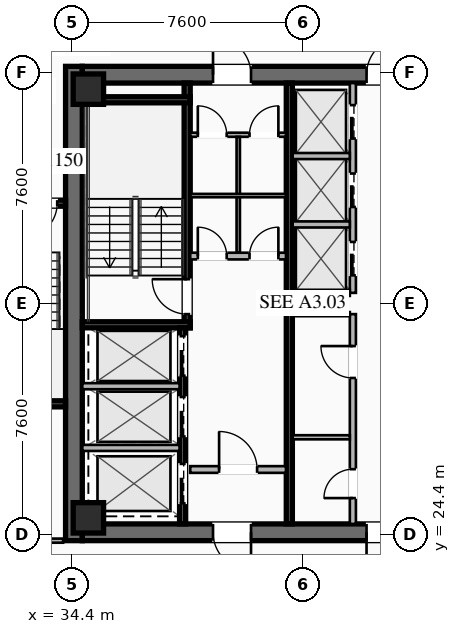
"""IFC4 building model, lengths in metres.
Left out: names, types, materials, properties, quantities, classifications, styles, units other than length and angle.
Written with IfcOpenShell. Run it as: python <this file> out.ifc"""

import sys

from ifc_helpers import new_model, si_unit, direction, frame, frame_2d, origin, origin_2d, place, context, subcontext, project, spatial, rectangle, hollow_rectangle, extrude, element, fill, save


model = new_model("IFC4")
c1 = context("Model", 3, precision=1e-05, world=origin(), true_north=direction((0.0, 1.0)))
c2 = subcontext(c1, "Body", "Model", "MODEL_VIEW")
j1 = project(units=[si_unit("LENGTHUNIT", "METRE"), si_unit("PLANEANGLEUNIT", "RADIAN")], contexts=[c1])
p1 = place(None, origin())
s1 = spatial("IfcSite", under=j1, at=p1, CompositionType="ELEMENT")
p2 = place(p1, origin())
s2 = spatial("IfcBuilding", under=s1, at=p2, CompositionType="ELEMENT")
p3 = place(p2, frame((0.0, 0.0, 117.95)))
s3 = spatial("IfcBuildingStorey", under=s2, at=p3, CompositionType="ELEMENT", Elevation=117.95)
p4 = place(p3, frame((34.475, 24.2, 0.0), z_axis=(0.0, 0.0, 1.0), x_axis=(0.0, 1.0, 0.0)))
e1 = element("IfcWall", 1, at=p4, inside=s3, PredefinedType="SHEAR", context=c2, shape_type="SweptSolid", body=[
    extrude(rectangle(XDim=15.6, YDim=0.55, at=frame_2d((7.8, 0.0))), origin(), (0.0, 0.0, 1.0), 3.55),
])
p5 = place(p3, frame((49.25, 24.475, 0.0), z_axis=(0.0, 0.0, 1.0), x_axis=(-1.0, 0.0, 0.0)))
e2 = element("IfcWall", 2, at=p5, inside=s3, PredefinedType="SHEAR", context=c2, shape_type="SweptSolid", body=[
    extrude(rectangle(XDim=14.5, YDim=0.55, at=frame_2d((7.25, 0.0))), origin(), (0.0, 0.0, 1.0), 3.55),
])
p6 = place(p5, frame((8.95, 0.0, 0.0)))
e3 = element("IfcOpeningElement", 3, at=p6, cuts=e2, PredefinedType="OPENING", context=c2, shape_type="SweptSolid", body=[
    extrude(rectangle(XDim=1.25, YDim=2.25, at=frame_2d((0.625, 1.125))), frame((0.0, 0.285, 0.0), z_axis=(0.0, -1.0, 0.0), x_axis=(1.0, 0.0, 0.0)), (0.0, 0.0, 1.0), 0.57),
])
p7 = place(p5, frame((3.9, 0.0, 0.0)))
e4 = element("IfcOpeningElement", 4, at=p7, cuts=e2, PredefinedType="OPENING", context=c2, shape_type="SweptSolid", body=[
    extrude(rectangle(XDim=1.25, YDim=2.25, at=frame_2d((0.625, 1.125))), frame((0.0, 0.285, 0.0), z_axis=(0.0, -1.0, 0.0), x_axis=(1.0, 0.0, 0.0)), (0.0, 0.0, 1.0), 0.57),
])
p8 = place(p3, frame((34.75, 39.525, 0.0), z_axis=(0.0, 0.0, 1.0), x_axis=(1.0, 0.0, 0.0)))
e5 = element("IfcWall", 5, at=p8, inside=s3, PredefinedType="SHEAR", context=c2, shape_type="SweptSolid", body=[
    extrude(rectangle(XDim=14.5, YDim=0.55, at=frame_2d((7.25, 0.0))), origin(), (0.0, 0.0, 1.0), 3.55),
])
p9 = place(p8, frame((4.3, 0.0, 0.0)))
e6 = element("IfcOpeningElement", 6, at=p9, cuts=e5, PredefinedType="OPENING", context=c2, shape_type="SweptSolid", body=[
    extrude(rectangle(XDim=1.25, YDim=2.25, at=frame_2d((0.625, 1.125))), frame((0.0, 0.285, 0.0), z_axis=(0.0, -1.0, 0.0), x_axis=(1.0, 0.0, 0.0)), (0.0, 0.0, 1.0), 0.57),
])
p10 = place(p8, frame((9.35, 0.0, 0.0)))
e7 = element("IfcOpeningElement", 7, at=p10, cuts=e5, PredefinedType="OPENING", context=c2, shape_type="SweptSolid", body=[
    extrude(rectangle(XDim=1.25, YDim=2.25, at=frame_2d((0.625, 1.125))), frame((0.0, 0.285, 0.0), z_axis=(0.0, -1.0, 0.0), x_axis=(1.0, 0.0, 0.0)), (0.0, 0.0, 1.0), 0.57),
])
for number, where, z_axis, x_axis in (
    (8, (34.95, 24.95, 0.0), (0.0, 0.0, 1.0), (1.0, 0.0, 0.0)),
    (9, (34.95, 39.05, 0.0), (0.0, 0.0, 1.0), (1.0, 0.0, 0.0)),
):
    element("IfcColumn", number, at=place(p3, frame(where, z_axis=z_axis, x_axis=x_axis)), inside=s3, PredefinedType="COLUMN", context=c2, shape_type="SweptSolid", body=[
        extrude(hollow_rectangle(XDim=1.0, YDim=1.0, WallThickness=0.04, at=origin_2d()), origin(), (0.0, 0.0, 1.0), 3.37),
    ])
p11 = place(p3, frame((38.2, 31.2, 0.0), z_axis=(0.0, 0.0, 1.0), x_axis=(0.0, 1.0, 0.0)))
e10 = element("IfcWall", 10, at=p11, inside=s3, PredefinedType="SHEAR", context=c2, shape_type="SweptSolid", body=[
    extrude(rectangle(XDim=8.05, YDim=0.2, at=frame_2d((4.025, 0.0))), origin(), (0.0, 0.0, 1.0), 3.37),
])
p12 = place(p11, frame((0.45, 0.0, 0.0)))
e11 = element("IfcOpeningElement", 11, at=p12, cuts=e10, PredefinedType="OPENING", context=c2, shape_type="SweptSolid", body=[
    extrude(rectangle(XDim=1.15, YDim=2.2, at=frame_2d((0.575, 1.1))), frame((0.0, 0.11, 0.0), z_axis=(0.0, -1.0, 0.0), x_axis=(1.0, 0.0, 0.0)), (0.0, 0.0, 1.0), 0.22),
])
for number, where, z_axis, x_axis in (
    (12, (34.75, 31.3, 0.0), (0.0, 0.0, 1.0), (1.0, 0.0, 0.0)),
    (13, (34.75, 38.7, 0.0), (0.0, 0.0, 1.0), (1.0, 0.0, 0.0)),
):
    element("IfcWall", number, at=place(p3, frame(where, z_axis=z_axis, x_axis=x_axis)), inside=s3, PredefinedType="SHEAR", context=c2, shape_type="SweptSolid", body=[
        extrude(rectangle(XDim=3.55, YDim=0.2, at=frame_2d((1.775, 0.0))), origin(), (0.0, 0.0, 1.0), 3.37),
    ])
p13 = place(p3, frame((41.56, 24.75, 0.0), z_axis=(0.0, 0.0, 1.0), x_axis=(0.0, 1.0, 0.0)))
e14 = element("IfcWall", 14, at=p13, inside=s3, PredefinedType="SHEAR", context=c2, shape_type="SweptSolid", body=[
    extrude(rectangle(XDim=14.5, YDim=0.2, at=frame_2d((7.25, 0.0))), origin(), (0.0, 0.0, 1.0), 3.37),
])
p14 = place(p3, frame((38.3, 33.56, 0.0), z_axis=(0.0, 0.0, 1.0), x_axis=(1.0, 0.0, 0.0)))
e15 = element("IfcWall", 15, at=p14, inside=s3, PredefinedType="SOLIDWALL", context=c2, shape_type="SweptSolid", body=[
    extrude(rectangle(XDim=3.15, YDim=0.22, at=frame_2d((1.575, 0.0))), origin(), (0.0, 0.0, 1.0), 2.723),
])
p15 = place(p14, frame((0.25, 0.0, 0.0)))
e16 = element("IfcOpeningElement", 16, at=p15, cuts=e15, PredefinedType="OPENING", context=c2, shape_type="SweptSolid", body=[
    extrude(rectangle(XDim=0.95, YDim=2.05, at=frame_2d((0.475, 1.025))), frame((0.0, 0.12, 0.0), z_axis=(0.0, -1.0, 0.0), x_axis=(1.0, 0.0, 0.0)), (0.0, 0.0, 1.0), 0.24),
])
p16 = place(p14, frame((1.95, 0.0, 0.0)))
e17 = element("IfcOpeningElement", 17, at=p16, cuts=e15, PredefinedType="OPENING", context=c2, shape_type="SweptSolid", body=[
    extrude(rectangle(XDim=0.95, YDim=2.05, at=frame_2d((0.475, 1.025))), frame((0.0, 0.12, 0.0), z_axis=(0.0, -1.0, 0.0), x_axis=(1.0, 0.0, 0.0)), (0.0, 0.0, 1.0), 0.24),
])
p17 = place(p3, frame((38.3, 26.54, 0.0), z_axis=(0.0, 0.0, 1.0), x_axis=(1.0, 0.0, 0.0)))
e18 = element("IfcWall", 18, at=p17, inside=s3, PredefinedType="SOLIDWALL", context=c2, shape_type="SweptSolid", body=[
    extrude(rectangle(XDim=3.15, YDim=0.22, at=frame_2d((1.575, 0.0))), origin(), (0.0, 0.0, 1.0), 2.723),
])
p18 = place(p17, frame((0.95, 0.0, 0.0)))
e19 = element("IfcOpeningElement", 19, at=p18, cuts=e18, PredefinedType="OPENING", context=c2, shape_type="SweptSolid", body=[
    extrude(rectangle(XDim=1.25, YDim=2.25, at=frame_2d((0.625, 1.125))), frame((0.0, 0.12, 0.0), z_axis=(0.0, -1.0, 0.0), x_axis=(1.0, 0.0, 0.0)), (0.0, 0.0, 1.0), 0.24),
])
p19 = place(p3, frame((38.05, 24.75, 0.0), z_axis=(0.0, 0.0, 1.0), x_axis=(0.0, 1.0, 0.0)))
e20 = element("IfcWall", 20, at=p19, inside=s3, PredefinedType="SHEAR", context=c2, shape_type="SweptSolid", body=[
    extrude(rectangle(XDim=6.45, YDim=0.2, at=frame_2d((3.225, 0.0))), origin(), (0.0, 0.0, 1.0), 3.37),
])
p20 = place(p19, frame((4.875, 0.0, 0.0)))
e21 = element("IfcOpeningElement", 21, at=p20, cuts=e20, PredefinedType="OPENING", context=c2, shape_type="SweptSolid", body=[
    extrude(rectangle(XDim=1.3, YDim=2.25, at=frame_2d((0.65, 1.125))), frame((0.0, 0.11, 0.0), z_axis=(0.0, -1.0, 0.0), x_axis=(1.0, 0.0, 0.0)), (0.0, 0.0, 1.0), 0.22),
])
p21 = place(p19, frame((2.875, 0.0, 0.0)))
e22 = element("IfcOpeningElement", 22, at=p21, cuts=e20, PredefinedType="OPENING", context=c2, shape_type="SweptSolid", body=[
    extrude(rectangle(XDim=1.3, YDim=2.25, at=frame_2d((0.65, 1.125))), frame((0.0, 0.11, 0.0), z_axis=(0.0, -1.0, 0.0), x_axis=(1.0, 0.0, 0.0)), (0.0, 0.0, 1.0), 0.22),
])
p22 = place(p19, frame((0.675, 0.0, 0.0)))
e23 = element("IfcOpeningElement", 23, at=p22, cuts=e20, PredefinedType="OPENING", context=c2, shape_type="SweptSolid", body=[
    extrude(rectangle(XDim=1.3, YDim=2.25, at=frame_2d((0.65, 1.125))), frame((0.0, 0.11, 0.0), z_axis=(0.0, -1.0, 0.0), x_axis=(1.0, 0.0, 0.0)), (0.0, 0.0, 1.0), 0.22),
])
for number, where, z_axis, x_axis in (
    (24, (34.75, 27.25, 0.0), (0.0, 0.0, 1.0), (1.0, 0.0, 0.0)),
    (25, (34.75, 29.28, 0.0), (0.0, 0.0, 1.0), (1.0, 0.0, 0.0)),
):
    element("IfcWall", number, at=place(p3, frame(where, z_axis=z_axis, x_axis=x_axis)), inside=s3, PredefinedType="SOLIDWALL", context=c2, shape_type="SweptSolid", body=[
        extrude(rectangle(XDim=3.2, YDim=0.2, at=frame_2d((1.6, 0.0))), origin(), (0.0, 0.0, 1.0), 3.37),
    ])
p23 = place(p3, frame((38.3, 37.55, 0.0), z_axis=(0.0, 0.0, 1.0), x_axis=(1.0, 0.0, 0.0)))
e26 = element("IfcWall", 26, at=p23, inside=s3, PredefinedType="PARTITIONING", context=c2, shape_type="SweptSolid", body=[
    extrude(rectangle(XDim=3.15, YDim=0.135, at=frame_2d((1.575, 0.0))), origin(), (0.0, 0.0, 1.0), 2.723),
])
p24 = place(p23, frame((0.25, 0.0, 0.0)))
e27 = element("IfcOpeningElement", 27, at=p24, cuts=e26, PredefinedType="OPENING", context=c2, shape_type="SweptSolid", body=[
    extrude(rectangle(XDim=0.95, YDim=2.05, at=frame_2d((0.475, 1.025))), frame((0.0, 0.077, 0.0), z_axis=(0.0, -1.0, 0.0), x_axis=(1.0, 0.0, 0.0)), (0.0, 0.0, 1.0), 0.155),
])
p25 = place(p23, frame((1.95, 0.0, 0.0)))
e28 = element("IfcOpeningElement", 28, at=p25, cuts=e26, PredefinedType="OPENING", context=c2, shape_type="SweptSolid", body=[
    extrude(rectangle(XDim=0.95, YDim=2.05, at=frame_2d((0.475, 1.025))), frame((0.0, 0.077, 0.0), z_axis=(0.0, -1.0, 0.0), x_axis=(1.0, 0.0, 0.0)), (0.0, 0.0, 1.0), 0.155),
])
p26 = place(p3, frame((39.88, 33.68, 0.0), z_axis=(0.0, 0.0, 1.0), x_axis=(0.0, 1.0, 0.0)))
e29 = element("IfcWall", 29, at=p26, inside=s3, PredefinedType="PARTITIONING", context=c2, shape_type="SweptSolid", body=[
    extrude(rectangle(XDim=3.8, YDim=0.11, at=frame_2d((1.9, 0.0))), origin(), (0.0, 0.0, 1.0), 2.723),
])
p27 = place(p3, frame((38.3, 35.55, 0.0), z_axis=(0.0, 0.0, 1.0), x_axis=(1.0, 0.0, 0.0)))
e30 = element("IfcWall", 30, at=p27, inside=s3, PredefinedType="PARTITIONING", context=c2, shape_type="SweptSolid", body=[
    extrude(rectangle(XDim=3.15, YDim=0.11, at=frame_2d((1.575, 0.0))), origin(), (0.0, 0.0, 1.0), 2.723),
])
p28 = place(p3, frame((43.65, 24.75, 0.0), z_axis=(0.0, 0.0, 1.0), x_axis=(0.0, 1.0, 0.0)))
e31 = element("IfcWall", 31, at=p28, inside=s3, PredefinedType="SOLIDWALL", context=c2, shape_type="SweptSolid", body=[
    extrude(rectangle(XDim=6.9, YDim=0.2, at=frame_2d((3.45, 0.0))), origin(), (0.0, 0.0, 1.0), 2.723),
])
p29 = place(p28, frame((0.85, 0.0, 0.0)))
e32 = element("IfcOpeningElement", 32, at=p29, cuts=e31, PredefinedType="OPENING", context=c2, shape_type="SweptSolid", body=[
    extrude(rectangle(XDim=0.95, YDim=2.05, at=frame_2d((0.475, 1.025))), frame((0.0, 0.11, 0.0), z_axis=(0.0, -1.0, 0.0), x_axis=(1.0, 0.0, 0.0)), (0.0, 0.0, 1.0), 0.22),
])
p30 = place(p28, frame((4.8, 0.0, 0.0)))
e33 = element("IfcOpeningElement", 33, at=p30, cuts=e31, PredefinedType="OPENING", context=c2, shape_type="SweptSolid", body=[
    extrude(rectangle(XDim=1.05, YDim=2.2, at=frame_2d((0.525, 1.1))), frame((0.0, 0.11, 0.0), z_axis=(0.0, -1.0, 0.0), x_axis=(1.0, 0.0, 0.0)), (0.0, 0.0, 1.0), 0.22),
])
for number, where, z_axis, x_axis in (
    (34, (41.67, 31.65, 0.0), (0.0, 0.0, 1.0), (1.0, 0.0, 0.0)),
    (35, (41.67, 27.6, 0.0), (0.0, 0.0, 1.0), (1.0, 0.0, 0.0)),
):
    element("IfcWall", number, at=place(p3, frame(where, z_axis=z_axis, x_axis=x_axis)), inside=s3, PredefinedType="PARTITIONING", context=c2, shape_type="SweptSolid", body=[
        extrude(rectangle(XDim=1.88, YDim=0.135, at=frame_2d((0.94, 0.0))), origin(), (0.0, 0.0, 1.0), 2.723),
    ])
p31 = place(p3, frame((43.65, 32.35, 0.0), z_axis=(0.0, 0.0, 1.0), x_axis=(0.0, 1.0, 0.0)))
e36 = element("IfcWall", 36, at=p31, inside=s3, PredefinedType="SOLIDWALL", context=c2, shape_type="SweptSolid", body=[
    extrude(rectangle(XDim=6.9, YDim=0.2, at=frame_2d((3.45, 0.0))), origin(), (0.0, 0.0, 1.0), 3.37),
])
p32 = place(p31, frame((0.575, 0.0, 0.0)))
e37 = element("IfcOpeningElement", 37, at=p32, cuts=e36, PredefinedType="OPENING", context=c2, shape_type="SweptSolid", body=[
    extrude(rectangle(XDim=1.1, YDim=2.2, at=frame_2d((0.55, 1.1))), frame((0.0, 0.11, 0.0), z_axis=(0.0, -1.0, 0.0), x_axis=(1.0, 0.0, 0.0)), (0.0, 0.0, 1.0), 0.22),
])
p33 = place(p31, frame((2.825, 0.0, 0.0)))
e38 = element("IfcOpeningElement", 38, at=p33, cuts=e36, PredefinedType="OPENING", context=c2, shape_type="SweptSolid", body=[
    extrude(rectangle(XDim=1.1, YDim=2.2, at=frame_2d((0.55, 1.1))), frame((0.0, 0.11, 0.0), z_axis=(0.0, -1.0, 0.0), x_axis=(1.0, 0.0, 0.0)), (0.0, 0.0, 1.0), 0.22),
])
p34 = place(p31, frame((5.075, 0.0, 0.0)))
e39 = element("IfcOpeningElement", 39, at=p34, cuts=e36, PredefinedType="OPENING", context=c2, shape_type="SweptSolid", body=[
    extrude(rectangle(XDim=1.1, YDim=2.2, at=frame_2d((0.55, 1.1))), frame((0.0, 0.11, 0.0), z_axis=(0.0, -1.0, 0.0), x_axis=(1.0, 0.0, 0.0)), (0.0, 0.0, 1.0), 0.22),
])
for number, where, z_axis, x_axis in (
    (40, (41.67, 32.35, 0.0), (0.0, 0.0, 1.0), (1.0, 0.0, 0.0)),
    (41, (41.67, 34.6, 0.0), (0.0, 0.0, 1.0), (1.0, 0.0, 0.0)),
    (42, (41.67, 36.85, 0.0), (0.0, 0.0, 1.0), (1.0, 0.0, 0.0)),
):
    element("IfcWall", number, at=place(p3, frame(where, z_axis=z_axis, x_axis=x_axis)), inside=s3, PredefinedType="SOLIDWALL", context=c2, shape_type="SweptSolid", body=[
        extrude(rectangle(XDim=1.88, YDim=0.2, at=frame_2d((0.94, 0.0))), origin(), (0.0, 0.0, 1.0), 3.37),
    ])
p35 = place(p3, frame((34.2, 35.3, 0.0), z_axis=(0.0, 0.0, 1.0), x_axis=(-1.0, 0.0, 0.0)))
e43 = element("IfcWall", 43, at=p35, inside=s3, PredefinedType="SHEAR", context=c2, shape_type="SweptSolid", body=[
    extrude(rectangle(XDim=3.4, YDim=0.2, at=frame_2d((1.7, 0.0))), origin(), (0.0, 0.0, 1.0), 3.37),
])
p36 = place(p35, frame((0.275, 0.0, 0.0)))
e44 = element("IfcOpeningElement", 44, at=p36, cuts=e43, PredefinedType="OPENING", context=c2, shape_type="SweptSolid", body=[
    extrude(rectangle(XDim=1.15, YDim=2.2, at=frame_2d((0.575, 1.1))), frame((0.0, 0.11, 0.0), z_axis=(0.0, -1.0, 0.0), x_axis=(1.0, 0.0, 0.0)), (0.0, 0.0, 1.0), 0.22),
])
p37 = place(p3, frame((30.8, 28.7, 0.0), z_axis=(0.0, 0.0, 1.0), x_axis=(1.0, 0.0, 0.0)))
e45 = element("IfcWall", 45, at=p37, inside=s3, PredefinedType="SHEAR", context=c2, shape_type="SweptSolid", body=[
    extrude(rectangle(XDim=3.4, YDim=0.2, at=frame_2d((1.7, 0.0))), origin(), (0.0, 0.0, 1.0), 3.37),
])
p38 = place(p3, frame((22.72, 24.2, 0.0), z_axis=(0.0, 0.0, 1.0), x_axis=(1.0, 0.0, 0.0)))
e46 = element("IfcWall", 46, at=p38, inside=s3, PredefinedType="PARTITIONING", context=c2, shape_type="SweptSolid", body=[
    extrude(rectangle(XDim=11.4, YDim=0.135, at=frame_2d((5.7, 0.0))), origin(), (0.0, 0.0, 1.0), 2.723),
])
p39 = place(p38, frame((8.405, 0.0, 0.0)))
e47 = element("IfcOpeningElement", 47, at=p39, cuts=e46, PredefinedType="OPENING", context=c2, shape_type="SweptSolid", body=[
    extrude(rectangle(XDim=0.95, YDim=2.05, at=frame_2d((0.475, 1.025))), frame((0.0, 0.077, 0.0), z_axis=(0.0, -1.0, 0.0), x_axis=(1.0, 0.0, 0.0)), (0.0, 0.0, 1.0), 0.155),
])
p40 = place(p9, origin())
e48 = element("IfcDoor", 48, at=p40, inside=s3, OperationType="SINGLE_SWING_LEFT", PredefinedType="DOOR", context=c2, shape_type="SweptSolid", body=[
    extrude(rectangle(XDim=1.25, YDim=2.25, at=frame_2d((0.625, 1.125))), frame((0.0, 0.025, 0.0), z_axis=(0.0, -1.0, 0.0), x_axis=(1.0, 0.0, 0.0)), (0.0, 0.0, 1.0), 0.05),
])
fill(e6, e48)
p41 = place(p10, origin())
e49 = element("IfcDoor", 49, at=p41, inside=s3, OperationType="SINGLE_SWING_RIGHT", PredefinedType="DOOR", context=c2, shape_type="SweptSolid", body=[
    extrude(rectangle(XDim=1.25, YDim=2.25, at=frame_2d((0.625, 1.125))), frame((0.0, 0.025, 0.0), z_axis=(0.0, -1.0, 0.0), x_axis=(1.0, 0.0, 0.0)), (0.0, 0.0, 1.0), 0.05),
])
fill(e7, e49)
p42 = place(p6, origin())
e50 = element("IfcDoor", 50, at=p42, inside=s3, OperationType="SINGLE_SWING_LEFT", PredefinedType="DOOR", context=c2, shape_type="SweptSolid", body=[
    extrude(rectangle(XDim=1.25, YDim=2.25, at=frame_2d((0.625, 1.125))), frame((0.0, 0.025, 0.0), z_axis=(0.0, -1.0, 0.0), x_axis=(1.0, 0.0, 0.0)), (0.0, 0.0, 1.0), 0.05),
])
fill(e3, e50)
p43 = place(p7, origin())
e51 = element("IfcDoor", 51, at=p43, inside=s3, OperationType="SINGLE_SWING_RIGHT", PredefinedType="DOOR", context=c2, shape_type="SweptSolid", body=[
    extrude(rectangle(XDim=1.25, YDim=2.25, at=frame_2d((0.625, 1.125))), frame((0.0, 0.025, 0.0), z_axis=(0.0, -1.0, 0.0), x_axis=(1.0, 0.0, 0.0)), (0.0, 0.0, 1.0), 0.05),
])
fill(e4, e51)
p44 = place(p12, origin())
e52 = element("IfcDoor", 52, at=p44, inside=s3, OperationType="SINGLE_SWING_RIGHT", PredefinedType="DOOR", context=c2, shape_type="SweptSolid", body=[
    extrude(rectangle(XDim=1.15, YDim=2.2, at=frame_2d((0.575, 1.1))), frame((0.0, 0.025, 0.0), z_axis=(0.0, -1.0, 0.0), x_axis=(1.0, 0.0, 0.0)), (0.0, 0.0, 1.0), 0.05),
])
fill(e11, e52)
p45 = place(p18, origin())
e53 = element("IfcDoor", 53, at=p45, inside=s3, OperationType="SINGLE_SWING_LEFT", PredefinedType="DOOR", context=c2, shape_type="SweptSolid", body=[
    extrude(rectangle(XDim=1.25, YDim=2.25, at=frame_2d((0.625, 1.125))), frame((0.0, 0.025, 0.0), z_axis=(0.0, -1.0, 0.0), x_axis=(1.0, 0.0, 0.0)), (0.0, 0.0, 1.0), 0.05),
])
fill(e19, e53)
p46 = place(p24, origin())
e54 = element("IfcDoor", 54, at=p46, inside=s3, OperationType="SINGLE_SWING_LEFT", PredefinedType="DOOR", context=c2, shape_type="SweptSolid", body=[
    extrude(rectangle(XDim=0.95, YDim=2.05, at=frame_2d((0.475, 1.025))), frame((0.0, 0.025, 0.0), z_axis=(0.0, -1.0, 0.0), x_axis=(1.0, 0.0, 0.0)), (0.0, 0.0, 1.0), 0.05),
])
fill(e27, e54)
p47 = place(p25, origin())
e55 = element("IfcDoor", 55, at=p47, inside=s3, OperationType="SINGLE_SWING_RIGHT", PredefinedType="DOOR", context=c2, shape_type="SweptSolid", body=[
    extrude(rectangle(XDim=0.95, YDim=2.05, at=frame_2d((0.475, 1.025))), frame((0.0, 0.025, 0.0), z_axis=(0.0, -1.0, 0.0), x_axis=(1.0, 0.0, 0.0)), (0.0, 0.0, 1.0), 0.05),
])
fill(e28, e55)
p48 = place(p15, origin())
e56 = element("IfcDoor", 56, at=p48, inside=s3, OperationType="SINGLE_SWING_LEFT", PredefinedType="DOOR", context=c2, shape_type="SweptSolid", body=[
    extrude(rectangle(XDim=0.95, YDim=2.05, at=frame_2d((0.475, 1.025))), frame((0.0, 0.025, 0.0), z_axis=(0.0, -1.0, 0.0), x_axis=(1.0, 0.0, 0.0)), (0.0, 0.0, 1.0), 0.05),
])
fill(e16, e56)
p49 = place(p16, origin())
e57 = element("IfcDoor", 57, at=p49, inside=s3, OperationType="SINGLE_SWING_RIGHT", PredefinedType="DOOR", context=c2, shape_type="SweptSolid", body=[
    extrude(rectangle(XDim=0.95, YDim=2.05, at=frame_2d((0.475, 1.025))), frame((0.0, 0.025, 0.0), z_axis=(0.0, -1.0, 0.0), x_axis=(1.0, 0.0, 0.0)), (0.0, 0.0, 1.0), 0.05),
])
fill(e17, e57)
p50 = place(p29, origin())
e58 = element("IfcDoor", 58, at=p50, inside=s3, OperationType="SINGLE_SWING_LEFT", PredefinedType="DOOR", context=c2, shape_type="SweptSolid", body=[
    extrude(rectangle(XDim=0.95, YDim=2.05, at=frame_2d((0.475, 1.025))), frame((0.0, 0.025, 0.0), z_axis=(0.0, -1.0, 0.0), x_axis=(1.0, 0.0, 0.0)), (0.0, 0.0, 1.0), 0.05),
])
fill(e32, e58)
p51 = place(p30, origin())
e59 = element("IfcDoor", 59, at=p51, inside=s3, OperationType="SINGLE_SWING_RIGHT", PredefinedType="DOOR", context=c2, shape_type="SweptSolid", body=[
    extrude(rectangle(XDim=1.05, YDim=2.2, at=frame_2d((0.525, 1.1))), frame((0.0, 0.025, 0.0), z_axis=(0.0, -1.0, 0.0), x_axis=(1.0, 0.0, 0.0)), (0.0, 0.0, 1.0), 0.05),
])
fill(e33, e59)
p52 = place(p36, origin())
e60 = element("IfcDoor", 60, at=p52, inside=s3, OperationType="SINGLE_SWING_RIGHT", PredefinedType="DOOR", context=c2, shape_type="SweptSolid", body=[
    extrude(rectangle(XDim=1.15, YDim=2.2, at=frame_2d((0.575, 1.1))), frame((0.0, 0.025, 0.0), z_axis=(0.0, -1.0, 0.0), x_axis=(1.0, 0.0, 0.0)), (0.0, 0.0, 1.0), 0.05),
])
fill(e44, e60)
p53 = place(p20, origin())
e61 = element("IfcDoor", 61, at=p53, inside=s3, OperationType="SLIDING_TO_LEFT", PredefinedType="DOOR", context=c2, shape_type="SweptSolid", body=[
    extrude(rectangle(XDim=1.3, YDim=2.25, at=frame_2d((0.65, 1.125))), frame((0.0, 0.025, 0.0), z_axis=(0.0, -1.0, 0.0), x_axis=(1.0, 0.0, 0.0)), (0.0, 0.0, 1.0), 0.05),
])
fill(e21, e61)
p54 = place(p21, origin())
e62 = element("IfcDoor", 62, at=p54, inside=s3, OperationType="SLIDING_TO_LEFT", PredefinedType="DOOR", context=c2, shape_type="SweptSolid", body=[
    extrude(rectangle(XDim=1.3, YDim=2.25, at=frame_2d((0.65, 1.125))), frame((0.0, 0.025, 0.0), z_axis=(0.0, -1.0, 0.0), x_axis=(1.0, 0.0, 0.0)), (0.0, 0.0, 1.0), 0.05),
])
fill(e22, e62)
p55 = place(p22, origin())
e63 = element("IfcDoor", 63, at=p55, inside=s3, OperationType="SLIDING_TO_LEFT", PredefinedType="DOOR", context=c2, shape_type="SweptSolid", body=[
    extrude(rectangle(XDim=1.3, YDim=2.25, at=frame_2d((0.65, 1.125))), frame((0.0, 0.025, 0.0), z_axis=(0.0, -1.0, 0.0), x_axis=(1.0, 0.0, 0.0)), (0.0, 0.0, 1.0), 0.05),
])
fill(e23, e63)
p56 = place(p32, origin())
e64 = element("IfcDoor", 64, at=p56, inside=s3, OperationType="SLIDING_TO_LEFT", PredefinedType="DOOR", context=c2, shape_type="SweptSolid", body=[
    extrude(rectangle(XDim=1.1, YDim=2.2, at=frame_2d((0.55, 1.1))), frame((0.0, 0.025, 0.0), z_axis=(0.0, -1.0, 0.0), x_axis=(1.0, 0.0, 0.0)), (0.0, 0.0, 1.0), 0.05),
])
fill(e37, e64)
p57 = place(p33, origin())
e65 = element("IfcDoor", 65, at=p57, inside=s3, OperationType="SLIDING_TO_LEFT", PredefinedType="DOOR", context=c2, shape_type="SweptSolid", body=[
    extrude(rectangle(XDim=1.1, YDim=2.2, at=frame_2d((0.55, 1.1))), frame((0.0, 0.025, 0.0), z_axis=(0.0, -1.0, 0.0), x_axis=(1.0, 0.0, 0.0)), (0.0, 0.0, 1.0), 0.05),
])
fill(e38, e65)
p58 = place(p34, origin())
e66 = element("IfcDoor", 66, at=p58, inside=s3, OperationType="SLIDING_TO_LEFT", PredefinedType="DOOR", context=c2, shape_type="SweptSolid", body=[
    extrude(rectangle(XDim=1.1, YDim=2.2, at=frame_2d((0.55, 1.1))), frame((0.0, 0.025, 0.0), z_axis=(0.0, -1.0, 0.0), x_axis=(1.0, 0.0, 0.0)), (0.0, 0.0, 1.0), 0.05),
])
fill(e39, e66)
save(model, sys.argv[1])
